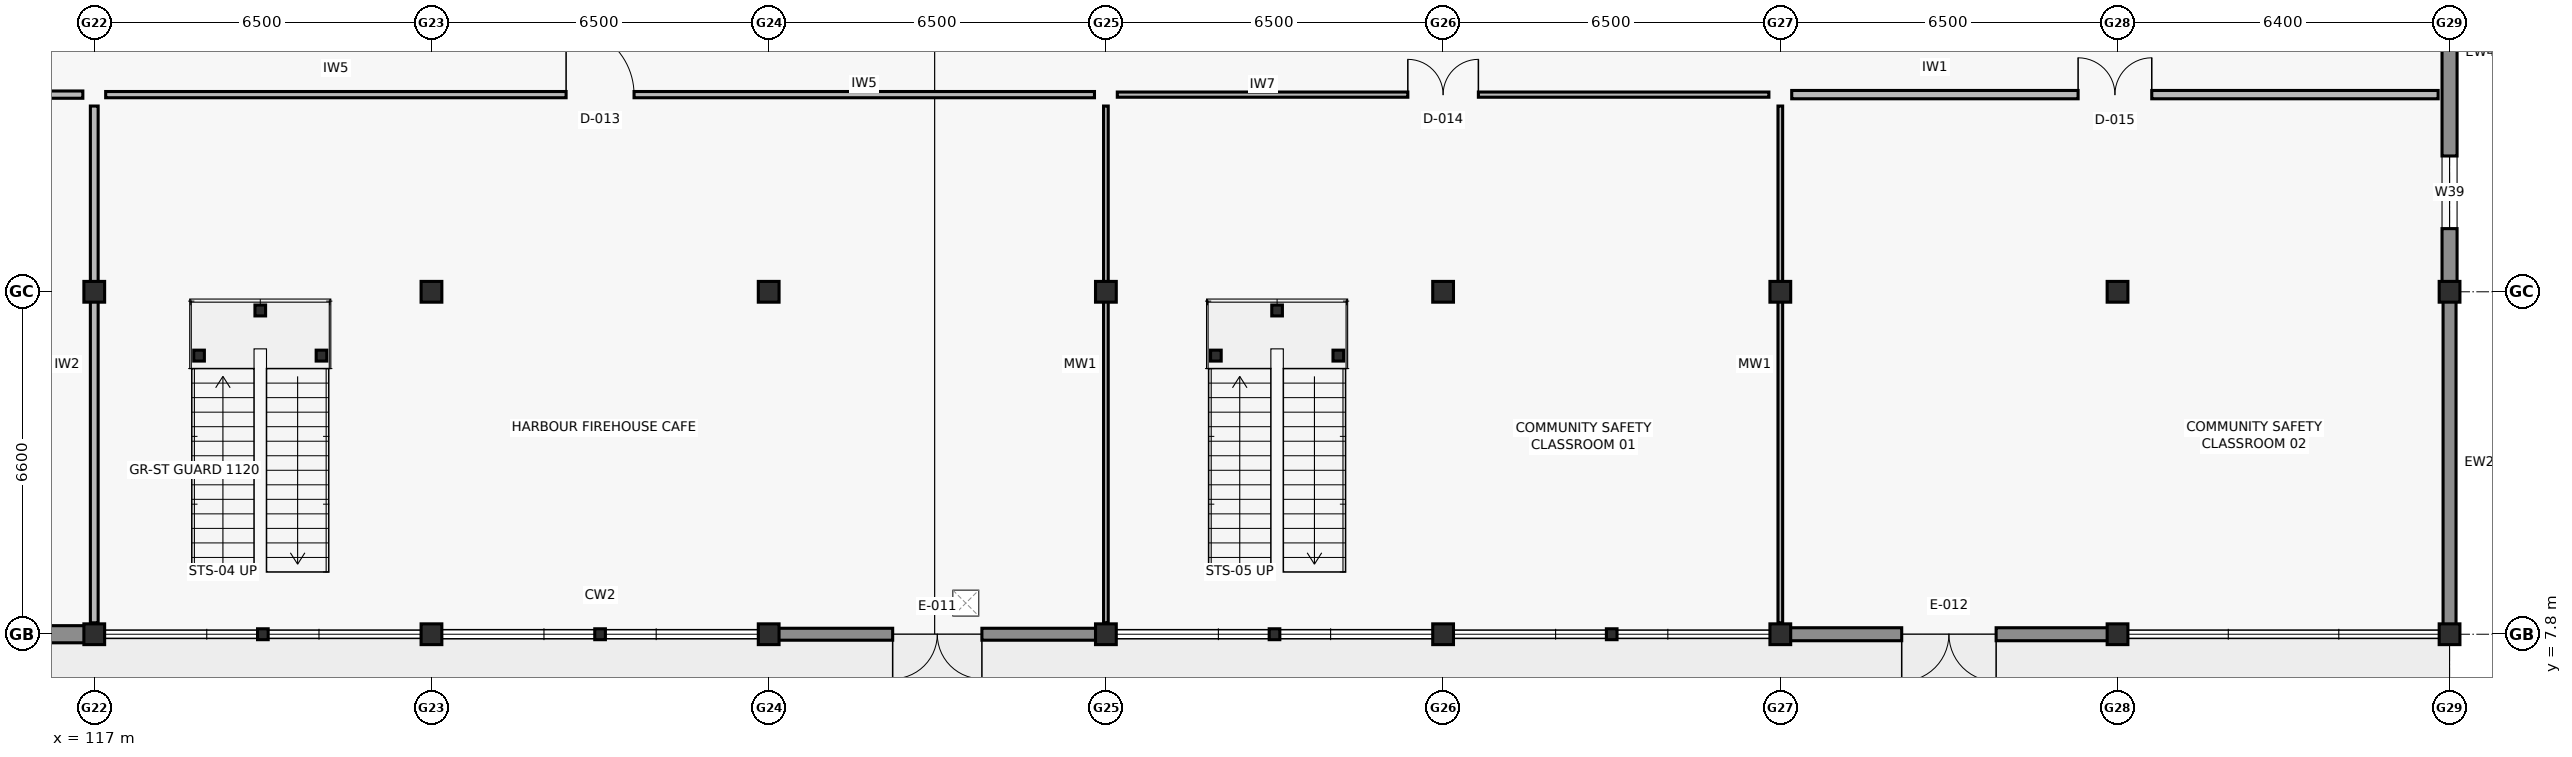
"""IFC4 building model, lengths in metres.
Left out: names, types, materials, properties, quantities, classifications, styles, units other than length and angle.
Written with IfcOpenShell. Run it as: python <this file> out.ifc"""

import sys

from ifc_helpers import new_model, si_unit, direction, frame, frame_2d, origin, origin_2d, place, context, subcontext, project, spatial, rectangle, i_section, extrude, element, fill, save


model = new_model("IFC4")
c1 = context("Model", 3, precision=1e-05, world=origin(), true_north=direction((0.0, 1.0)))
c2 = subcontext(c1, "Body", "Model", "MODEL_VIEW")
j1 = project(units=[si_unit("LENGTHUNIT", "METRE"), si_unit("PLANEANGLEUNIT", "RADIAN")], contexts=[c1])
p1 = place(None, origin())
s1 = spatial("IfcSite", under=j1, at=p1, CompositionType="ELEMENT")
p2 = place(p1, origin())
s2 = spatial("IfcBuilding", under=s1, at=p2, CompositionType="ELEMENT")
p3 = place(p2, origin())
s3 = spatial("IfcBuildingStorey", under=s2, at=p3, CompositionType="ELEMENT", Elevation=0.0)
for number, where, z_axis, x_axis in (
    (1, (117.0, 7.8, 0.0), (0.0, 0.0, 1.0), (1.0, 0.0, 0.0)),
    (2, (117.0, 14.4, 0.0), (0.0, 0.0, 1.0), (1.0, 0.0, 0.0)),
    (3, (123.5, 7.8, 0.0), (0.0, 0.0, 1.0), (1.0, 0.0, 0.0)),
    (4, (123.5, 14.4, 0.0), (0.0, 0.0, 1.0), (1.0, 0.0, 0.0)),
    (5, (130.0, 7.8, 0.0), (0.0, 0.0, 1.0), (1.0, 0.0, 0.0)),
    (6, (130.0, 14.4, 0.0), (0.0, 0.0, 1.0), (1.0, 0.0, 0.0)),
    (7, (136.5, 7.8, 0.0), (0.0, 0.0, 1.0), (1.0, 0.0, 0.0)),
    (8, (136.5, 14.4, 0.0), (0.0, 0.0, 1.0), (1.0, 0.0, 0.0)),
    (9, (143.0, 7.8, 0.0), (0.0, 0.0, 1.0), (1.0, 0.0, 0.0)),
    (10, (143.0, 14.4, 0.0), (0.0, 0.0, 1.0), (1.0, 0.0, 0.0)),
    (11, (149.5, 7.8, 0.0), (0.0, 0.0, 1.0), (1.0, 0.0, 0.0)),
    (12, (149.5, 14.4, 0.0), (0.0, 0.0, 1.0), (1.0, 0.0, 0.0)),
    (13, (156.0, 7.8, 0.0), (0.0, 0.0, 1.0), (1.0, 0.0, 0.0)),
    (14, (156.0, 14.4, 0.0), (0.0, 0.0, 1.0), (1.0, 0.0, 0.0)),
    (15, (162.4, 7.8, 0.0), (0.0, 0.0, 1.0), (1.0, 0.0, 0.0)),
    (16, (162.4, 14.4, 0.0), (0.0, 0.0, 1.0), (1.0, 0.0, 0.0)),
):
    element("IfcColumn", number, at=place(p3, frame(where, z_axis=z_axis, x_axis=x_axis)), inside=s3, PredefinedType="COLUMN", context=c2, shape_type="SweptSolid", body=[
        extrude(i_section(OverallWidth=0.4, OverallDepth=0.4, WebThickness=0.02, FlangeThickness=0.032, at=origin_2d()), origin(), (0.0, 0.0, 1.0), 5.4),
    ])
for number, where, z_axis, x_axis in (
    (17, (120.25, 7.8, 0.0), (0.0, 0.0, 1.0), (1.0, 0.0, 0.0)),
    (18, (126.75, 7.8, 0.0), (0.0, 0.0, 1.0), (1.0, 0.0, 0.0)),
    (19, (139.75, 7.8, 0.0), (0.0, 0.0, 1.0), (1.0, 0.0, 0.0)),
    (20, (146.25, 7.8, 0.0), (0.0, 0.0, 1.0), (1.0, 0.0, 0.0)),
):
    element("IfcColumn", number, at=place(p3, frame(where, z_axis=z_axis, x_axis=x_axis)), inside=s3, PredefinedType="PILASTER", context=c2, shape_type="SweptSolid", body=[
        extrude(i_section(OverallWidth=0.205, OverallDepth=0.21, WebThickness=0.009, FlangeThickness=0.014, FilletRadius=0.011, at=origin_2d()), origin(), (0.0, 0.0, 1.0), 5.4),
    ])
p4 = place(p3, frame((116.995, 7.8, 0.0), z_axis=(0.0, 0.0, 1.0), x_axis=(-1.0, 0.0, 0.0)))
e21 = element("IfcWall", 21, at=p4, inside=s3, PredefinedType="SOLIDWALL", context=c2, shape_type="SweptSolid", body=[
    extrude(rectangle(XDim=6.49, YDim=0.33, at=frame_2d((3.245, 0.0))), origin(), (0.0, 0.0, 1.0), 4.52),
])
p5 = place(p4, frame((2.225, 0.0, 0.0)))
e22 = element("IfcOpeningElement", 22, at=p5, cuts=e21, PredefinedType="OPENING", context=c2, shape_type="SweptSolid", body=[
    extrude(rectangle(XDim=2.04, YDim=2.28, at=frame_2d((1.02, 1.14))), frame((0.0, 0.175, 0.0), z_axis=(0.0, -1.0, 0.0), x_axis=(1.0, 0.0, 0.0)), (0.0, 0.0, 1.0), 0.35),
])
p6 = place(p3, frame((136.495, 7.8, 0.0), z_axis=(0.0, 0.0, 1.0), x_axis=(-1.0, 0.0, 0.0)))
e23 = element("IfcWall", 23, at=p6, inside=s3, PredefinedType="SOLIDWALL", context=c2, shape_type="SweptSolid", body=[
    extrude(rectangle(XDim=6.49, YDim=0.23, at=frame_2d((3.245, 0.0))), origin(), (0.0, 0.0, 1.0), 4.52),
])
p7 = place(p6, frame((2.385, 0.0, 0.0)))
e24 = element("IfcOpeningElement", 24, at=p7, cuts=e23, PredefinedType="OPENING", context=c2, shape_type="SweptSolid", body=[
    extrude(rectangle(XDim=1.72, YDim=2.2, at=frame_2d((0.86, 1.1))), frame((0.0, 0.125, 0.0), z_axis=(0.0, -1.0, 0.0), x_axis=(1.0, 0.0, 0.0)), (0.0, 0.0, 1.0), 0.25),
])
p8 = place(p3, frame((155.995, 7.8, 0.0), z_axis=(0.0, 0.0, 1.0), x_axis=(-1.0, 0.0, 0.0)))
e25 = element("IfcWall", 25, at=p8, inside=s3, PredefinedType="SOLIDWALL", context=c2, shape_type="SweptSolid", body=[
    extrude(rectangle(XDim=6.49, YDim=0.25, at=frame_2d((3.245, 0.0))), origin(), (0.0, 0.0, 1.0), 4.52),
])
p9 = place(p8, frame((2.335, 0.0, 0.0)))
e26 = element("IfcOpeningElement", 26, at=p9, cuts=e25, PredefinedType="OPENING", context=c2, shape_type="SweptSolid", body=[
    extrude(rectangle(XDim=1.82, YDim=2.2, at=frame_2d((0.91, 1.1))), frame((0.0, 0.135, 0.0), z_axis=(0.0, -1.0, 0.0), x_axis=(1.0, 0.0, 0.0)), (0.0, 0.0, 1.0), 0.27),
])
p10 = place(p3, frame((162.4, 14.395, 0.0), z_axis=(0.0, 0.0, 1.0), x_axis=(0.0, -1.0, 0.0)))
e27 = element("IfcWall", 27, at=p10, inside=s3, PredefinedType="SOLIDWALL", context=c2, shape_type="SweptSolid", body=[
    extrude(rectangle(XDim=6.59, YDim=0.25, at=frame_2d((3.295, 0.0))), origin(), (0.0, 0.0, 1.0), 4.52),
])
p11 = place(p3, frame((162.4, 20.995, 0.0), z_axis=(0.0, 0.0, 1.0), x_axis=(0.0, -1.0, 0.0)))
e28 = element("IfcWall", 28, at=p11, inside=s3, PredefinedType="SOLIDWALL", context=c2, shape_type="SweptSolid", body=[
    extrude(rectangle(XDim=6.59, YDim=0.29, at=frame_2d((3.295, 0.0))), origin(), (0.0, 0.0, 1.0), 4.52),
])
p12 = place(p11, frame((3.978, 0.0, 0.8)))
e29 = element("IfcOpeningElement", 29, at=p12, cuts=e28, PredefinedType="OPENING", context=c2, shape_type="SweptSolid", body=[
    extrude(rectangle(XDim=1.4, YDim=1.65, at=frame_2d((0.7, 0.825))), frame((0.0, 0.155, 0.0), z_axis=(0.0, -1.0, 0.0), x_axis=(1.0, 0.0, 0.0)), (0.0, 0.0, 1.0), 0.31),
])
for number, where, z_axis, x_axis in (
    (30, (119.02, 13.17, 0.0), (0.0, 0.0, 1.0), (1.0, 0.0, 0.0)),
    (31, (121.38, 13.17, 0.0), (0.0, 0.0, 1.0), (1.0, 0.0, 0.0)),
    (32, (120.2, 14.04, 0.0), (0.0, 0.0, 1.0), (1.0, 0.0, 0.0)),
    (33, (138.62, 13.17, 0.0), (0.0, 0.0, 1.0), (1.0, 0.0, 0.0)),
    (34, (140.98, 13.17, 0.0), (0.0, 0.0, 1.0), (1.0, 0.0, 0.0)),
    (35, (139.8, 14.04, 0.0), (0.0, 0.0, 1.0), (1.0, 0.0, 0.0)),
):
    element("IfcColumn", number, at=place(p3, frame(where, z_axis=z_axis, x_axis=x_axis)), inside=s3, PredefinedType="COLUMN", context=c2, shape_type="SweptSolid", body=[
        extrude(i_section(OverallWidth=0.205, OverallDepth=0.21, WebThickness=0.009, FlangeThickness=0.014, FilletRadius=0.011, at=origin_2d()), origin(), (0.0, 0.0, 1.0), 2.52),
    ])
p13 = place(p3, frame((117.0, 8.02, 0.0), z_axis=(0.0, 0.0, 1.0), x_axis=(0.0, 1.0, 0.0)))
e36 = element("IfcWall", 36, at=p13, inside=s3, PredefinedType="PARTITIONING", context=c2, shape_type="SweptSolid", body=[
    extrude(rectangle(XDim=9.96, YDim=0.15, at=frame_2d((4.98, 0.0))), origin(), (0.0, 0.0, 1.0), 4.5),
])
p14 = place(p3, frame((104.22, 18.2, 0.0), z_axis=(0.0, 0.0, 1.0), x_axis=(1.0, 0.0, 0.0)))
e37 = element("IfcWall", 37, at=p14, inside=s3, PredefinedType="PARTITIONING", context=c2, shape_type="SweptSolid", body=[
    extrude(rectangle(XDim=12.56, YDim=0.14, at=frame_2d((6.28, 0.0))), origin(), (0.0, 0.0, 1.0), 4.5),
])
p15 = place(p14, frame((5.645, 0.0, 0.0)))
e38 = element("IfcOpeningElement", 38, at=p15, cuts=e37, PredefinedType="OPENING", context=c2, shape_type="SweptSolid", body=[
    extrude(rectangle(XDim=1.27, YDim=2.1, at=frame_2d((0.635, 1.05))), frame((0.0, 0.08, 0.0), z_axis=(0.0, -1.0, 0.0), x_axis=(1.0, 0.0, 0.0)), (0.0, 0.0, 1.0), 0.16),
])
p16 = place(p3, frame((136.5, 8.02, 0.0), z_axis=(0.0, 0.0, 1.0), x_axis=(0.0, 1.0, 0.0)))
e39 = element("IfcWall", 39, at=p16, inside=s3, PredefinedType="MOVABLE", context=c2, shape_type="SweptSolid", body=[
    extrude(rectangle(XDim=9.96, YDim=0.09, at=frame_2d((4.98, 0.0))), origin(), (0.0, 0.0, 1.0), 4.5),
])
p17 = place(p3, frame((117.22, 18.2, 0.0), z_axis=(0.0, 0.0, 1.0), x_axis=(1.0, 0.0, 0.0)))
e40 = element("IfcWall", 40, at=p17, inside=s3, PredefinedType="PARTITIONING", context=c2, shape_type="SweptSolid", body=[
    extrude(rectangle(XDim=19.06, YDim=0.12, at=frame_2d((9.53, 0.0))), origin(), (0.0, 0.0, 1.0), 4.5),
])
p18 = place(p17, frame((8.875, 0.0, 0.0)))
e41 = element("IfcOpeningElement", 41, at=p18, cuts=e40, PredefinedType="OPENING", context=c2, shape_type="SweptSolid", body=[
    extrude(rectangle(XDim=1.31, YDim=2.14, at=frame_2d((0.655, 1.07))), frame((0.0, 0.07, 0.0), z_axis=(0.0, -1.0, 0.0), x_axis=(1.0, 0.0, 0.0)), (0.0, 0.0, 1.0), 0.14),
])
p19 = place(p3, frame((149.5, 8.02, 0.0), z_axis=(0.0, 0.0, 1.0), x_axis=(0.0, 1.0, 0.0)))
e42 = element("IfcWall", 42, at=p19, inside=s3, PredefinedType="MOVABLE", context=c2, shape_type="SweptSolid", body=[
    extrude(rectangle(XDim=9.96, YDim=0.09, at=frame_2d((4.98, 0.0))), origin(), (0.0, 0.0, 1.0), 4.5),
])
p20 = place(p3, frame((136.72, 18.2, 0.0), z_axis=(0.0, 0.0, 1.0), x_axis=(1.0, 0.0, 0.0)))
e43 = element("IfcWall", 43, at=p20, inside=s3, PredefinedType="PARTITIONING", context=c2, shape_type="SweptSolid", body=[
    extrude(rectangle(XDim=12.56, YDim=0.1, at=frame_2d((6.28, 0.0))), origin(), (0.0, 0.0, 1.0), 4.5),
])
p21 = place(p20, frame((5.6, 0.0, 0.0)))
e44 = element("IfcOpeningElement", 44, at=p21, cuts=e43, PredefinedType="OPENING", context=c2, shape_type="SweptSolid", body=[
    extrude(rectangle(XDim=1.36, YDim=2.15, at=frame_2d((0.68, 1.075))), frame((0.0, 0.06, 0.0), z_axis=(0.0, -1.0, 0.0), x_axis=(1.0, 0.0, 0.0)), (0.0, 0.0, 1.0), 0.12),
])
p22 = place(p3, frame((149.72, 18.2, 0.0), z_axis=(0.0, 0.0, 1.0), x_axis=(1.0, 0.0, 0.0)))
e45 = element("IfcWall", 45, at=p22, inside=s3, PredefinedType="PARTITIONING", context=c2, shape_type="SweptSolid", body=[
    extrude(rectangle(XDim=12.46, YDim=0.16, at=frame_2d((6.23, 0.0))), origin(), (0.0, 0.0, 1.0), 4.5),
])
p23 = place(p22, frame((5.52, 0.0, 0.0)))
e46 = element("IfcOpeningElement", 46, at=p23, cuts=e45, PredefinedType="OPENING", context=c2, shape_type="SweptSolid", body=[
    extrude(rectangle(XDim=1.42, YDim=2.15, at=frame_2d((0.71, 1.075))), frame((0.0, 0.09, 0.0), z_axis=(0.0, -1.0, 0.0), x_axis=(1.0, 0.0, 0.0)), (0.0, 0.0, 1.0), 0.18),
])
p24 = place(p7, origin())
e47 = element("IfcDoor", 47, at=p24, inside=s3, OperationType="DOUBLE_DOOR_SINGLE_SWING", PredefinedType="DOOR", context=c2, shape_type="SweptSolid", body=[
    extrude(rectangle(XDim=1.72, YDim=2.2, at=frame_2d((0.86, 1.1))), frame((0.0, 0.025, 0.0), z_axis=(0.0, -1.0, 0.0), x_axis=(1.0, 0.0, 0.0)), (0.0, 0.0, 1.0), 0.05),
])
fill(e24, e47)
p25 = place(p9, origin())
e48 = element("IfcDoor", 48, at=p25, inside=s3, OperationType="DOUBLE_DOOR_SINGLE_SWING", PredefinedType="DOOR", context=c2, shape_type="SweptSolid", body=[
    extrude(rectangle(XDim=1.82, YDim=2.2, at=frame_2d((0.91, 1.1))), frame((0.0, 0.025, 0.0), z_axis=(0.0, -1.0, 0.0), x_axis=(1.0, 0.0, 0.0)), (0.0, 0.0, 1.0), 0.05),
])
fill(e26, e48)
p26 = place(p12, origin())
e49 = element("IfcWindow", 49, at=p26, inside=s3, PartitioningType="SINGLE_PANEL", PredefinedType="WINDOW", context=c2, shape_type="SweptSolid", body=[
    extrude(rectangle(XDim=1.4, YDim=1.65, at=frame_2d((0.7, 0.825))), frame((0.0, 0.03, 0.0), z_axis=(0.0, -1.0, 0.0), x_axis=(1.0, 0.0, 0.0)), (0.0, 0.0, 1.0), 0.06),
])
fill(e29, e49)
p27 = place(p18, origin())
e50 = element("IfcDoor", 50, at=p27, inside=s3, OperationType="SINGLE_SWING_LEFT", PredefinedType="DOOR", context=c2, shape_type="SweptSolid", body=[
    extrude(rectangle(XDim=1.31, YDim=2.14, at=frame_2d((0.655, 1.07))), frame((0.0, 0.025, 0.0), z_axis=(0.0, -1.0, 0.0), x_axis=(1.0, 0.0, 0.0)), (0.0, 0.0, 1.0), 0.05),
])
fill(e41, e50)
p28 = place(p21, origin())
e51 = element("IfcDoor", 51, at=p28, inside=s3, OperationType="DOUBLE_DOOR_SINGLE_SWING", PredefinedType="DOOR", context=c2, shape_type="SweptSolid", body=[
    extrude(rectangle(XDim=1.36, YDim=2.15, at=frame_2d((0.68, 1.075))), frame((0.0, 0.025, 0.0), z_axis=(0.0, -1.0, 0.0), x_axis=(1.0, 0.0, 0.0)), (0.0, 0.0, 1.0), 0.05),
])
fill(e44, e51)
p29 = place(p23, origin())
e52 = element("IfcDoor", 52, at=p29, inside=s3, OperationType="DOUBLE_DOOR_SINGLE_SWING", PredefinedType="DOOR", context=c2, shape_type="SweptSolid", body=[
    extrude(rectangle(XDim=1.42, YDim=2.15, at=frame_2d((0.71, 1.075))), frame((0.0, 0.025, 0.0), z_axis=(0.0, -1.0, 0.0), x_axis=(1.0, 0.0, 0.0)), (0.0, 0.0, 1.0), 0.05),
])
fill(e46, e52)
save(model, sys.argv[1])
